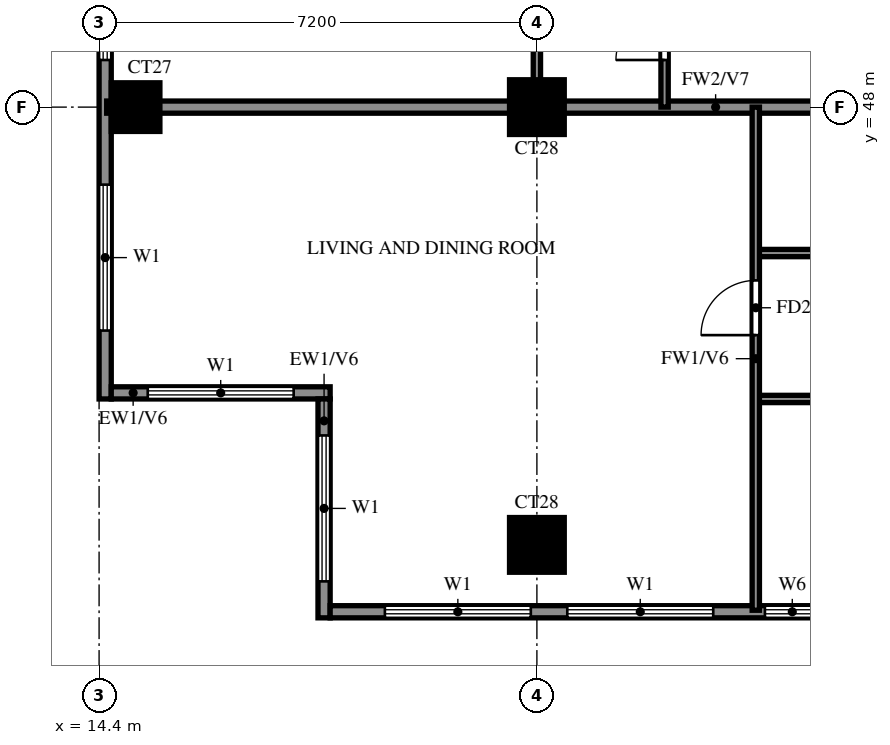
"""IFC4 building model, lengths in metres.
Left out: names, types, materials, properties, quantities, classifications, styles, units other than length and angle.
Written with IfcOpenShell. Run it as: python <this file> out.ifc"""

import sys

from ifc_helpers import new_model, si_unit, direction, frame, frame_2d, origin, origin_2d, place, context, subcontext, project, spatial, rectangle, extrude, source, transform, mapped, element, fill, save


model = new_model("IFC4")
c1 = context("Model", 3, precision=1e-05, world=origin(), true_north=direction((0.0, 1.0)))
c2 = subcontext(c1, "Body", "Model", "MODEL_VIEW")
j1 = project(units=[si_unit("LENGTHUNIT", "METRE"), si_unit("PLANEANGLEUNIT", "RADIAN")], contexts=[c1])
p1 = place(None, origin())
s1 = spatial("IfcSite", under=j1, at=p1, CompositionType="ELEMENT")
p2 = place(p1, origin())
s2 = spatial("IfcBuilding", under=s1, at=p2, CompositionType="ELEMENT")
p3 = place(p2, frame((0.0, 0.0, 202.5)))
s3 = spatial("IfcBuildingStorey", under=s2, at=p3, CompositionType="ELEMENT", Elevation=202.5)
m1 = source(origin(), c2, "Body", "SweptSolid", [
    extrude(rectangle(XDim=0.9, YDim=0.9, at=origin_2d()), origin(), (0.0, 0.0, 1.0), 3.1),
])
p4 = place(p3, frame((21.6, 40.8, 0.0), z_axis=(0.0, 0.0, 1.0), x_axis=(1.0, 0.0, 0.0)))
e1 = element("IfcColumn", 1, at=p4, inside=s3, PredefinedType="COLUMN", context=c2, shape_type="MappedRepresentation", body=[
    mapped(m1, transform((0.0, 0.0, 0.0))),
])
m2 = source(origin(), c2, "Body", "SweptSolid", [
    extrude(rectangle(XDim=0.8, YDim=0.8, at=origin_2d()), origin(), (0.0, 0.0, 1.0), 3.1),
])
p5 = place(p3, frame((15.0, 48.0, 0.0), z_axis=(0.0, 0.0, 1.0), x_axis=(1.0, 0.0, 0.0)))
e2 = element("IfcColumn", 2, at=p5, inside=s3, PredefinedType="COLUMN", context=c2, shape_type="MappedRepresentation", body=[
    mapped(m2, transform((0.0, 0.0, 0.0))),
])
p6 = place(p3, frame((21.6, 48.0, 0.0), z_axis=(0.0, 0.0, 1.0), x_axis=(1.0, 0.0, 0.0)))
e3 = element("IfcColumn", 3, at=p6, inside=s3, PredefinedType="COLUMN", context=c2, shape_type="MappedRepresentation", body=[
    mapped(m1, transform((0.0, 0.0, 0.0))),
])
p7 = place(p3, frame((14.5, 76.6, 0.0), z_axis=(0.0, 0.0, 1.0), x_axis=(0.0, -1.0, 0.0)))
e4 = element("IfcWall", 4, at=p7, inside=s3, PredefinedType="SOLIDWALL", context=c2, shape_type="SweptSolid", body=[
    extrude(rectangle(XDim=33.4, YDim=0.2, at=frame_2d((16.7, 0.0))), origin(), (0.0, 0.0, 1.0), 3.1),
])
p8 = place(p7, frame((4.3, 0.0, 0.0)))
e5 = element("IfcOpeningElement", 5, at=p8, cuts=e4, PredefinedType="OPENING", context=c2, shape_type="SweptSolid", body=[
    extrude(rectangle(XDim=1.8, YDim=2.4, at=frame_2d((0.9, 1.2))), frame((0.0, 0.11, 0.0), z_axis=(0.0, -1.0, 0.0), x_axis=(1.0, 0.0, 0.0)), (0.0, 0.0, 1.0), 0.22),
])
p9 = place(p7, frame((18.7, 0.0, 0.0)))
e6 = element("IfcOpeningElement", 6, at=p9, cuts=e4, PredefinedType="OPENING", context=c2, shape_type="SweptSolid", body=[
    extrude(rectangle(XDim=1.8, YDim=2.4, at=frame_2d((0.9, 1.2))), frame((0.0, 0.11, 0.0), z_axis=(0.0, -1.0, 0.0), x_axis=(1.0, 0.0, 0.0)), (0.0, 0.0, 1.0), 0.22),
])
p10 = place(p7, frame((29.875, 0.0, 0.6)))
e7 = element("IfcOpeningElement", 7, at=p10, cuts=e4, PredefinedType="OPENING", context=c2, shape_type="SweptSolid", body=[
    extrude(rectangle(XDim=2.4, YDim=2.4, at=frame_2d((1.2, 1.2))), frame((0.0, 0.11, 0.0), z_axis=(0.0, -1.0, 0.0), x_axis=(1.0, 0.0, 0.0)), (0.0, 0.0, 1.0), 0.22),
])
p11 = place(p7, frame((25.425, 0.0, 0.6)))
e8 = element("IfcOpeningElement", 8, at=p11, cuts=e4, PredefinedType="OPENING", context=c2, shape_type="SweptSolid", body=[
    extrude(rectangle(XDim=2.4, YDim=2.4, at=frame_2d((1.2, 1.2))), frame((0.0, 0.11, 0.0), z_axis=(0.0, -1.0, 0.0), x_axis=(1.0, 0.0, 0.0)), (0.0, 0.0, 1.0), 0.22),
])
p12 = place(p7, frame((21.875, 0.0, 0.6)))
e9 = element("IfcOpeningElement", 9, at=p12, cuts=e4, PredefinedType="OPENING", context=c2, shape_type="SweptSolid", body=[
    extrude(rectangle(XDim=1.2, YDim=2.4, at=frame_2d((0.6, 1.2))), frame((0.0, 0.11, 0.0), z_axis=(0.0, -1.0, 0.0), x_axis=(1.0, 0.0, 0.0)), (0.0, 0.0, 1.0), 0.22),
])
p13 = place(p7, frame((23.95, 0.0, 0.6)))
e10 = element("IfcOpeningElement", 10, at=p13, cuts=e4, PredefinedType="OPENING", context=c2, shape_type="SweptSolid", body=[
    extrude(rectangle(XDim=0.9, YDim=2.4, at=frame_2d((0.45, 1.2))), frame((0.0, 0.11, 0.0), z_axis=(0.0, -1.0, 0.0), x_axis=(1.0, 0.0, 0.0)), (0.0, 0.0, 1.0), 0.22),
])
p14 = place(p7, frame((14.675, 0.0, 0.6)))
e11 = element("IfcOpeningElement", 11, at=p14, cuts=e4, PredefinedType="OPENING", context=c2, shape_type="SweptSolid", body=[
    extrude(rectangle(XDim=1.8, YDim=2.4, at=frame_2d((0.9, 1.2))), frame((0.0, 0.11, 0.0), z_axis=(0.0, -1.0, 0.0), x_axis=(1.0, 0.0, 0.0)), (0.0, 0.0, 1.0), 0.22),
])
p15 = place(p7, frame((11.025, 0.0, 0.6)))
e12 = element("IfcOpeningElement", 12, at=p15, cuts=e4, PredefinedType="OPENING", context=c2, shape_type="SweptSolid", body=[
    extrude(rectangle(XDim=2.4, YDim=2.4, at=frame_2d((1.2, 1.2))), frame((0.0, 0.11, 0.0), z_axis=(0.0, -1.0, 0.0), x_axis=(1.0, 0.0, 0.0)), (0.0, 0.0, 1.0), 0.22),
])
p16 = place(p7, frame((7.625, 0.0, 1.5)))
e13 = element("IfcOpeningElement", 13, at=p16, cuts=e4, PredefinedType="OPENING", context=c2, shape_type="SweptSolid", body=[
    extrude(rectangle(XDim=0.9, YDim=0.9, at=frame_2d((0.45, 0.45))), frame((0.0, 0.11, 0.0), z_axis=(0.0, -1.0, 0.0), x_axis=(1.0, 0.0, 0.0)), (0.0, 0.0, 1.0), 0.22),
])
p17 = place(p7, frame((9.55, 0.0, 1.5)))
e14 = element("IfcOpeningElement", 14, at=p17, cuts=e4, PredefinedType="OPENING", context=c2, shape_type="SweptSolid", body=[
    extrude(rectangle(XDim=0.9, YDim=0.9, at=frame_2d((0.45, 0.45))), frame((0.0, 0.11, 0.0), z_axis=(0.0, -1.0, 0.0), x_axis=(1.0, 0.0, 0.0)), (0.0, 0.0, 1.0), 0.22),
])
p18 = place(p7, frame((0.6, 0.0, 0.6)))
e15 = element("IfcOpeningElement", 15, at=p18, cuts=e4, PredefinedType="OPENING", context=c2, shape_type="SweptSolid", body=[
    extrude(rectangle(XDim=1.2, YDim=2.4, at=frame_2d((0.6, 1.2))), frame((0.0, 0.11, 0.0), z_axis=(0.0, -1.0, 0.0), x_axis=(1.0, 0.0, 0.0)), (0.0, 0.0, 1.0), 0.22),
])
p19 = place(p3, frame((14.6, 43.3, 0.0), z_axis=(0.0, 0.0, 1.0), x_axis=(1.0, 0.0, 0.0)))
e16 = element("IfcWall", 16, at=p19, inside=s3, PredefinedType="SOLIDWALL", context=c2, shape_type="SweptSolid", body=[
    extrude(rectangle(XDim=3.6, YDim=0.2, at=frame_2d((1.8, 0.0))), origin(), (0.0, 0.0, 1.0), 3.1),
])
p20 = place(p19, frame((0.6, 0.0, 0.6)))
e17 = element("IfcOpeningElement", 17, at=p20, cuts=e16, PredefinedType="OPENING", context=c2, shape_type="SweptSolid", body=[
    extrude(rectangle(XDim=2.4, YDim=2.4, at=frame_2d((1.2, 1.2))), frame((0.0, 0.11, 0.0), z_axis=(0.0, -1.0, 0.0), x_axis=(1.0, 0.0, 0.0)), (0.0, 0.0, 1.0), 0.22),
])
p21 = place(p3, frame((18.1, 43.2, 0.0), z_axis=(0.0, 0.0, 1.0), x_axis=(0.0, -1.0, 0.0)))
e18 = element("IfcWall", 18, at=p21, inside=s3, PredefinedType="SOLIDWALL", context=c2, shape_type="SweptSolid", body=[
    extrude(rectangle(XDim=3.6, YDim=0.2, at=frame_2d((1.8, 0.0))), origin(), (0.0, 0.0, 1.0), 3.1),
])
p22 = place(p21, frame((0.6, 0.0, 0.6)))
e19 = element("IfcOpeningElement", 19, at=p22, cuts=e18, PredefinedType="OPENING", context=c2, shape_type="SweptSolid", body=[
    extrude(rectangle(XDim=2.4, YDim=2.4, at=frame_2d((1.2, 1.2))), frame((0.0, 0.11, 0.0), z_axis=(0.0, -1.0, 0.0), x_axis=(1.0, 0.0, 0.0)), (0.0, 0.0, 1.0), 0.22),
])
p23 = place(p3, frame((18.2, 39.7, 0.0), z_axis=(0.0, 0.0, 1.0), x_axis=(1.0, 0.0, 0.0)))
e20 = element("IfcWall", 20, at=p23, inside=s3, PredefinedType="SOLIDWALL", context=c2, shape_type="SweptSolid", body=[
    extrude(rectangle(XDim=23.8, YDim=0.2, at=frame_2d((11.9, 0.0))), origin(), (0.0, 0.0, 1.0), 3.1),
])
p24 = place(p23, frame((11.5, 0.0, 0.0)))
e21 = element("IfcOpeningElement", 21, at=p24, cuts=e20, PredefinedType="OPENING", context=c2, shape_type="SweptSolid", body=[
    extrude(rectangle(XDim=1.8, YDim=2.4, at=frame_2d((0.9, 1.2))), frame((0.0, 0.11, 0.0), z_axis=(0.0, -1.0, 0.0), x_axis=(1.0, 0.0, 0.0)), (0.0, 0.0, 1.0), 0.22),
])
p25 = place(p23, frame((0.9, 0.0, 0.6)))
e22 = element("IfcOpeningElement", 22, at=p25, cuts=e20, PredefinedType="OPENING", context=c2, shape_type="SweptSolid", body=[
    extrude(rectangle(XDim=2.4, YDim=2.4, at=frame_2d((1.2, 1.2))), frame((0.0, 0.11, 0.0), z_axis=(0.0, -1.0, 0.0), x_axis=(1.0, 0.0, 0.0)), (0.0, 0.0, 1.0), 0.22),
])
p26 = place(p23, frame((3.9, 0.0, 0.6)))
e23 = element("IfcOpeningElement", 23, at=p26, cuts=e20, PredefinedType="OPENING", context=c2, shape_type="SweptSolid", body=[
    extrude(rectangle(XDim=2.4, YDim=2.4, at=frame_2d((1.2, 1.2))), frame((0.0, 0.11, 0.0), z_axis=(0.0, -1.0, 0.0), x_axis=(1.0, 0.0, 0.0)), (0.0, 0.0, 1.0), 0.22),
])
p27 = place(p23, frame((13.75, 0.0, 0.6)))
e24 = element("IfcOpeningElement", 24, at=p27, cuts=e20, PredefinedType="OPENING", context=c2, shape_type="SweptSolid", body=[
    extrude(rectangle(XDim=0.9, YDim=2.4, at=frame_2d((0.45, 1.2))), frame((0.0, 0.11, 0.0), z_axis=(0.0, -1.0, 0.0), x_axis=(1.0, 0.0, 0.0)), (0.0, 0.0, 1.0), 0.22),
])
p28 = place(p23, frame((7.15, 0.0, 1.5)))
e25 = element("IfcOpeningElement", 25, at=p28, cuts=e20, PredefinedType="OPENING", context=c2, shape_type="SweptSolid", body=[
    extrude(rectangle(XDim=0.9, YDim=0.9, at=frame_2d((0.45, 0.45))), frame((0.0, 0.11, 0.0), z_axis=(0.0, -1.0, 0.0), x_axis=(1.0, 0.0, 0.0)), (0.0, 0.0, 1.0), 0.22),
])
p29 = place(p23, frame((9.25, 0.0, 1.5)))
e26 = element("IfcOpeningElement", 26, at=p29, cuts=e20, PredefinedType="OPENING", context=c2, shape_type="SweptSolid", body=[
    extrude(rectangle(XDim=0.9, YDim=0.9, at=frame_2d((0.45, 0.45))), frame((0.0, 0.11, 0.0), z_axis=(0.0, -1.0, 0.0), x_axis=(1.0, 0.0, 0.0)), (0.0, 0.0, 1.0), 0.22),
])
p30 = place(p3, frame((14.525, 48.0, 0.0), z_axis=(0.0, 0.0, 1.0), x_axis=(1.0, 0.0, 0.0)))
e27 = element("IfcWall", 27, at=p30, inside=s3, PredefinedType="SOLIDWALL", context=c2, shape_type="SweptSolid", body=[
    extrude(rectangle(XDim=19.075, YDim=0.2, at=frame_2d((9.538, 0.0))), origin(), (0.0, 0.0, 1.0), 3.1),
])
p31 = place(p3, frame((25.2, 43.2, 0.0), z_axis=(0.0, 0.0, 1.0), x_axis=(1.0, 0.0, 0.0)))
e28 = element("IfcWall", 28, at=p31, inside=s3, PredefinedType="PARTITIONING", context=c2, shape_type="SweptSolid", body=[
    extrude(rectangle(XDim=3.6, YDim=0.12, at=frame_2d((1.8, 0.0))), origin(), (0.0, 0.0, 1.0), 3.1),
])
p32 = place(p3, frame((25.2, 45.6, 0.0), z_axis=(0.0, 0.0, 1.0), x_axis=(1.0, 0.0, 0.0)))
e29 = element("IfcWall", 29, at=p32, inside=s3, PredefinedType="PARTITIONING", context=c2, shape_type="SweptSolid", body=[
    extrude(rectangle(XDim=6.0, YDim=0.12, at=frame_2d((3.0, 0.0))), origin(), (0.0, 0.0, 1.0), 3.1),
])
p33 = place(p32, frame((2.55, 0.0, 0.0)))
e30 = element("IfcOpeningElement", 30, at=p33, cuts=e29, PredefinedType="OPENING", context=c2, shape_type="SweptSolid", body=[
    extrude(rectangle(XDim=0.9, YDim=2.1, at=frame_2d((0.45, 1.05))), frame((0.0, 0.07, 0.0), z_axis=(0.0, -1.0, 0.0), x_axis=(1.0, 0.0, 0.0)), (0.0, 0.0, 1.0), 0.14),
])
p34 = place(p3, frame((21.6, 48.0, 0.0), z_axis=(0.0, 0.0, 1.0), x_axis=(0.0, 1.0, 0.0)))
e31 = element("IfcWall", 31, at=p34, inside=s3, PredefinedType="PARTITIONING", context=c2, shape_type="SweptSolid", body=[
    extrude(rectangle(XDim=18.0, YDim=0.12, at=frame_2d((9.0, 0.0))), origin(), (0.0, 0.0, 1.0), 3.1),
])
p35 = place(p34, frame((1.35, 0.0, 0.0)))
e32 = element("IfcOpeningElement", 32, at=p35, cuts=e31, PredefinedType="OPENING", context=c2, shape_type="SweptSolid", body=[
    extrude(rectangle(XDim=0.9, YDim=2.1, at=frame_2d((0.45, 1.05))), frame((0.0, 0.07, 0.0), z_axis=(0.0, -1.0, 0.0), x_axis=(1.0, 0.0, 0.0)), (0.0, 0.0, 1.0), 0.14),
])
p36 = place(p34, frame((7.95, 0.0, 0.0)))
e33 = element("IfcOpeningElement", 33, at=p36, cuts=e31, PredefinedType="OPENING", context=c2, shape_type="SweptSolid", body=[
    extrude(rectangle(XDim=1.5, YDim=2.1, at=frame_2d((0.75, 1.05))), frame((0.0, 0.07, 0.0), z_axis=(0.0, -1.0, 0.0), x_axis=(1.0, 0.0, 0.0)), (0.0, 0.0, 1.0), 0.14),
])
p37 = place(p34, frame((12.15, 0.0, 0.0)))
e34 = element("IfcOpeningElement", 34, at=p37, cuts=e31, PredefinedType="OPENING", context=c2, shape_type="SweptSolid", body=[
    extrude(rectangle(XDim=0.9, YDim=2.1, at=frame_2d((0.45, 1.05))), frame((0.0, 0.07, 0.0), z_axis=(0.0, -1.0, 0.0), x_axis=(1.0, 0.0, 0.0)), (0.0, 0.0, 1.0), 0.14),
])
p38 = place(p34, frame((15.75, 0.0, 0.0)))
e35 = element("IfcOpeningElement", 35, at=p38, cuts=e31, PredefinedType="OPENING", context=c2, shape_type="SweptSolid", body=[
    extrude(rectangle(XDim=0.9, YDim=2.1, at=frame_2d((0.45, 1.05))), frame((0.0, 0.07, 0.0), z_axis=(0.0, -1.0, 0.0), x_axis=(1.0, 0.0, 0.0)), (0.0, 0.0, 1.0), 0.14),
])
p39 = place(p3, frame((23.7, 48.0, 0.0), z_axis=(0.0, 0.0, 1.0), x_axis=(0.0, 1.0, 0.0)))
e36 = element("IfcWall", 36, at=p39, inside=s3, PredefinedType="PARTITIONING", context=c2, shape_type="SweptSolid", body=[
    extrude(rectangle(XDim=5.2, YDim=0.12, at=frame_2d((2.6, 0.0))), origin(), (0.0, 0.0, 1.0), 3.1),
])
p40 = place(p39, frame((0.775, 0.0, 0.0)))
e37 = element("IfcOpeningElement", 37, at=p40, cuts=e36, PredefinedType="OPENING", context=c2, shape_type="SweptSolid", body=[
    extrude(rectangle(XDim=0.8, YDim=2.1, at=frame_2d((0.4, 1.05))), frame((0.0, 0.07, 0.0), z_axis=(0.0, -1.0, 0.0), x_axis=(1.0, 0.0, 0.0)), (0.0, 0.0, 1.0), 0.14),
])
p41 = place(p3, frame((25.2, 39.725, 0.0), z_axis=(0.0, 0.0, 1.0), x_axis=(0.0, 1.0, 0.0)))
e38 = element("IfcWall", 38, at=p41, inside=s3, PredefinedType="PARTITIONING", context=c2, shape_type="SweptSolid", body=[
    extrude(rectangle(XDim=8.275, YDim=0.12, at=frame_2d((4.137, 0.0))), origin(), (0.0, 0.0, 1.0), 3.1),
])
p42 = place(p41, frame((4.525, 0.0, 0.0)))
e39 = element("IfcOpeningElement", 39, at=p42, cuts=e38, PredefinedType="OPENING", context=c2, shape_type="SweptSolid", body=[
    extrude(rectangle(XDim=0.9, YDim=2.1, at=frame_2d((0.45, 1.05))), frame((0.0, 0.07, 0.0), z_axis=(0.0, -1.0, 0.0), x_axis=(1.0, 0.0, 0.0)), (0.0, 0.0, 1.0), 0.14),
])
p43 = place(p10, origin())
e40 = element("IfcWindow", 40, at=p43, inside=s3, PartitioningType="DOUBLE_PANEL_VERTICAL", PredefinedType="WINDOW", context=c2, shape_type="SweptSolid", body=[
    extrude(rectangle(XDim=2.4, YDim=2.4, at=frame_2d((1.2, 1.2))), frame((0.0, 0.03, 0.0), z_axis=(0.0, -1.0, 0.0), x_axis=(1.0, 0.0, 0.0)), (0.0, 0.0, 1.0), 0.06),
])
fill(e7, e40)
p44 = place(p11, origin())
e41 = element("IfcWindow", 41, at=p44, inside=s3, PartitioningType="DOUBLE_PANEL_VERTICAL", PredefinedType="WINDOW", context=c2, shape_type="SweptSolid", body=[
    extrude(rectangle(XDim=2.4, YDim=2.4, at=frame_2d((1.2, 1.2))), frame((0.0, 0.03, 0.0), z_axis=(0.0, -1.0, 0.0), x_axis=(1.0, 0.0, 0.0)), (0.0, 0.0, 1.0), 0.06),
])
fill(e8, e41)
p45 = place(p20, origin())
e42 = element("IfcWindow", 42, at=p45, inside=s3, PartitioningType="DOUBLE_PANEL_VERTICAL", PredefinedType="WINDOW", context=c2, shape_type="SweptSolid", body=[
    extrude(rectangle(XDim=2.4, YDim=2.4, at=frame_2d((1.2, 1.2))), frame((0.0, 0.03, 0.0), z_axis=(0.0, -1.0, 0.0), x_axis=(1.0, 0.0, 0.0)), (0.0, 0.0, 1.0), 0.06),
])
fill(e17, e42)
p46 = place(p22, origin())
e43 = element("IfcWindow", 43, at=p46, inside=s3, PartitioningType="DOUBLE_PANEL_VERTICAL", PredefinedType="WINDOW", context=c2, shape_type="SweptSolid", body=[
    extrude(rectangle(XDim=2.4, YDim=2.4, at=frame_2d((1.2, 1.2))), frame((0.0, 0.03, 0.0), z_axis=(0.0, -1.0, 0.0), x_axis=(1.0, 0.0, 0.0)), (0.0, 0.0, 1.0), 0.06),
])
fill(e19, e43)
p47 = place(p25, origin())
e44 = element("IfcWindow", 44, at=p47, inside=s3, PartitioningType="DOUBLE_PANEL_VERTICAL", PredefinedType="WINDOW", context=c2, shape_type="SweptSolid", body=[
    extrude(rectangle(XDim=2.4, YDim=2.4, at=frame_2d((1.2, 1.2))), frame((0.0, 0.03, 0.0), z_axis=(0.0, -1.0, 0.0), x_axis=(1.0, 0.0, 0.0)), (0.0, 0.0, 1.0), 0.06),
])
fill(e22, e44)
p48 = place(p26, origin())
e45 = element("IfcWindow", 45, at=p48, inside=s3, PartitioningType="DOUBLE_PANEL_VERTICAL", PredefinedType="WINDOW", context=c2, shape_type="SweptSolid", body=[
    extrude(rectangle(XDim=2.4, YDim=2.4, at=frame_2d((1.2, 1.2))), frame((0.0, 0.03, 0.0), z_axis=(0.0, -1.0, 0.0), x_axis=(1.0, 0.0, 0.0)), (0.0, 0.0, 1.0), 0.06),
])
fill(e23, e45)
p49 = place(p28, origin())
e46 = element("IfcWindow", 46, at=p49, inside=s3, PartitioningType="SINGLE_PANEL", PredefinedType="WINDOW", context=c2, shape_type="SweptSolid", body=[
    extrude(rectangle(XDim=0.9, YDim=0.9, at=frame_2d((0.45, 0.45))), frame((0.0, 0.03, 0.0), z_axis=(0.0, -1.0, 0.0), x_axis=(1.0, 0.0, 0.0)), (0.0, 0.0, 1.0), 0.06),
])
fill(e25, e46)
p50 = place(p42, origin())
e47 = element("IfcDoor", 47, at=p50, inside=s3, OperationType="SINGLE_SWING_LEFT", PredefinedType="DOOR", context=c2, shape_type="SweptSolid", body=[
    extrude(rectangle(XDim=0.9, YDim=2.1, at=frame_2d((0.45, 1.05))), frame((0.0, 0.025, 0.0), z_axis=(0.0, -1.0, 0.0), x_axis=(1.0, 0.0, 0.0)), (0.0, 0.0, 1.0), 0.05),
])
fill(e39, e47)
p51 = place(p40, origin())
e48 = element("IfcDoor", 48, at=p51, inside=s3, OperationType="SINGLE_SWING_LEFT", PredefinedType="DOOR", context=c2, shape_type="SweptSolid", body=[
    extrude(rectangle(XDim=0.8, YDim=2.1, at=frame_2d((0.4, 1.05))), frame((0.0, 0.025, 0.0), z_axis=(0.0, -1.0, 0.0), x_axis=(1.0, 0.0, 0.0)), (0.0, 0.0, 1.0), 0.05),
])
fill(e37, e48)
save(model, sys.argv[1])
